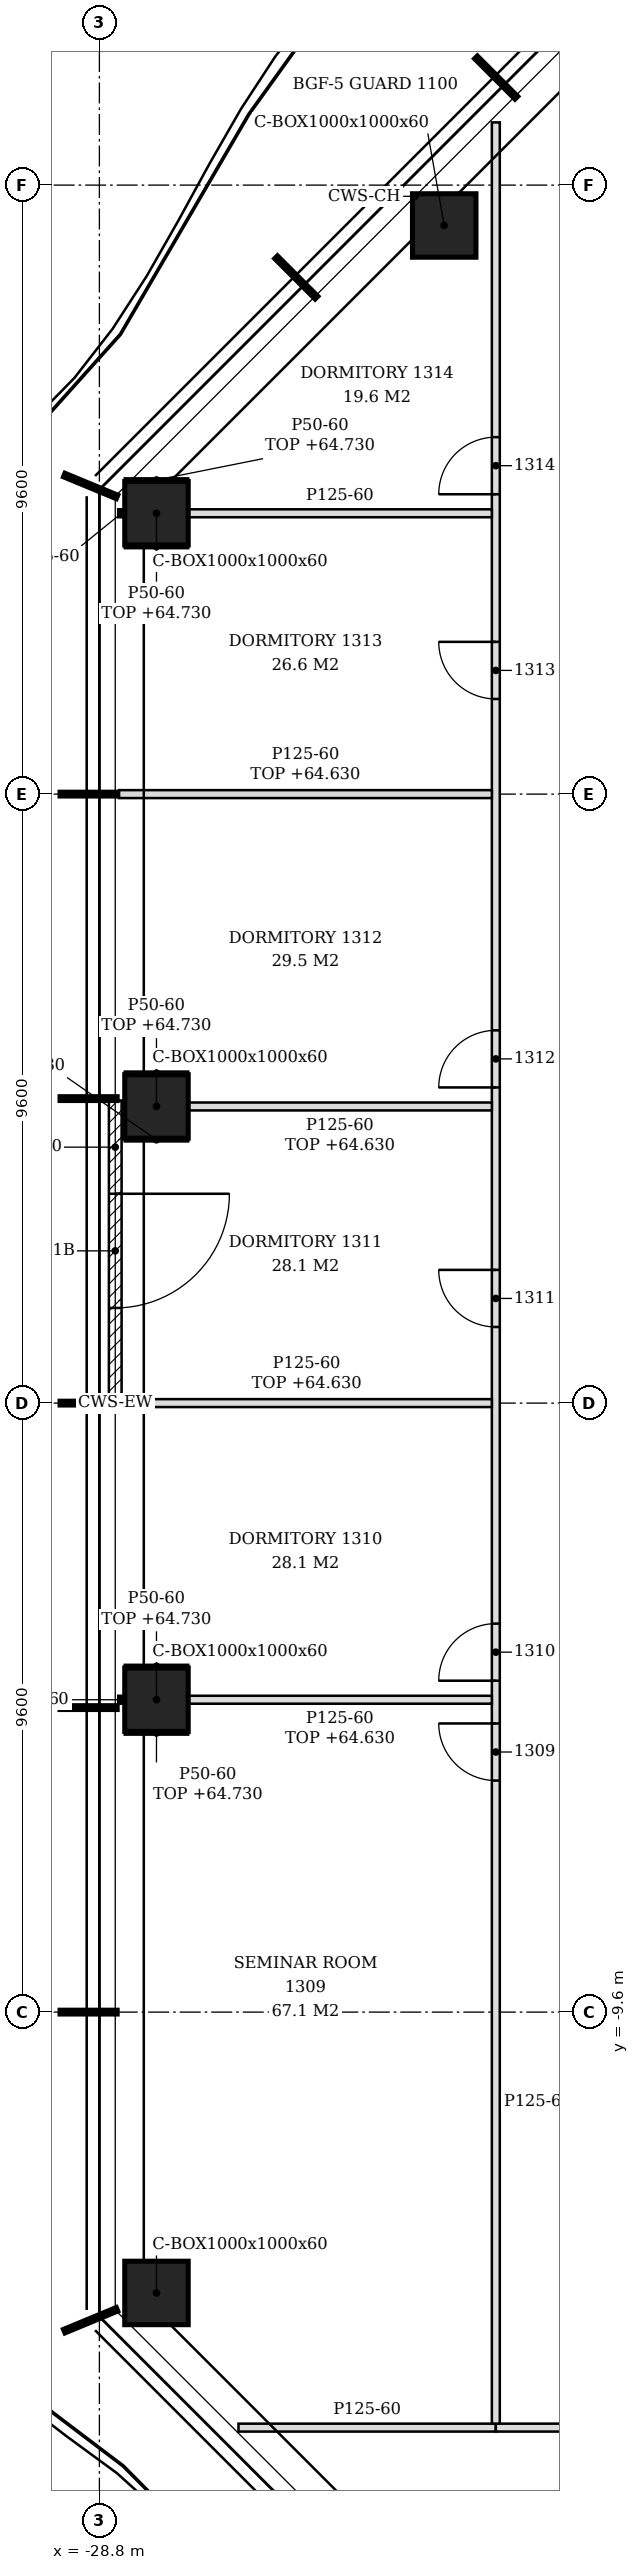
"""IFC4 building model, lengths in metres.
Left out: names, types, materials, properties, quantities, classifications, styles, units other than length and angle.
Written with IfcOpenShell. Run it as: python <this file> out.ifc"""

import sys

from ifc_helpers import new_model, si_unit, direction, frame, frame_2d, origin, origin_2d, place, context, subcontext, project, spatial, polyline, rectangle, hollow_rectangle, outline, extrude, element, fill, save


model = new_model("IFC4")
c1 = context("Model", 3, precision=1e-05, world=origin(), true_north=direction((0.0, 1.0)))
c2 = subcontext(c1, "Body", "Model", "MODEL_VIEW")
j1 = project(units=[si_unit("LENGTHUNIT", "METRE"), si_unit("PLANEANGLEUNIT", "RADIAN")], contexts=[c1])
p1 = place(None, origin())
s1 = spatial("IfcSite", under=j1, at=p1, CompositionType="ELEMENT")
p2 = place(p1, origin())
s2 = spatial("IfcBuilding", under=s1, at=p2, CompositionType="ELEMENT")
p3 = place(p2, frame((0.0, 0.0, 61.8)))
s3 = spatial("IfcBuildingStorey", under=s2, at=p3, CompositionType="ELEMENT", Elevation=61.8)
for number, where, z_axis, x_axis in (
    (1, (-23.364, 18.564, -0.15), (0.0, 0.0, 1.0), (1.0, 0.0, 0.0)),
    (2, (-27.9, 14.027, -0.15), (0.0, 0.0, 1.0), (1.0, 0.0, 0.0)),
    (3, (-27.9, 4.676, -0.15), (0.0, 0.0, 1.0), (1.0, 0.0, 0.0)),
    (4, (-27.9, -4.676, -0.15), (0.0, 0.0, 1.0), (1.0, 0.0, 0.0)),
    (5, (-27.9, -14.027, -0.15), (0.0, 0.0, 1.0), (1.0, 0.0, 0.0)),
):
    element("IfcColumn", number, at=place(p3, frame(where, z_axis=z_axis, x_axis=x_axis)), inside=s3, PredefinedType="COLUMN", context=c2, shape_type="SweptSolid", body=[
        extrude(hollow_rectangle(XDim=1.0, YDim=1.0, WallThickness=0.06, at=origin_2d()), origin(), (0.0, 0.0, 1.0), 3.6),
    ])
p4 = place(p3, frame((-28.55, 4.77, 0.0), z_axis=(0.0, 0.0, 1.0), x_axis=(0.0, -1.0, 0.0)))
e6 = element("IfcWall", 6, at=p4, inside=s3, PredefinedType="NOTDEFINED", context=c2, shape_type="SweptSolid", body=[
    extrude(rectangle(XDim=4.74, YDim=0.2, at=frame_2d((2.37, 0.0))), origin(), (0.0, 0.0, 1.0), 3.45),
])
p5 = place(p4, frame((1.47, 0.0, 0.0)))
e7 = element("IfcOpeningElement", 7, at=p5, cuts=e6, PredefinedType="OPENING", context=c2, shape_type="SweptSolid", body=[
    extrude(rectangle(XDim=1.8, YDim=2.4, at=frame_2d((0.9, 1.2))), frame((0.0, 0.11, 0.0), z_axis=(0.0, -1.0, 0.0), x_axis=(1.0, 0.0, 0.0)), (0.0, 0.0, 1.0), 0.22),
])
p6 = place(p3, frame((-26.607, -16.15, 0.0), z_axis=(0.0, 0.0, 1.0), x_axis=(1.0, 0.0, 0.0)))
e8 = element("IfcWall", 8, at=p6, inside=s3, PredefinedType="PARTITIONING", context=c2, shape_type="SweptSolid", body=[
    extrude(outline(polyline([(0.0, 0.0), (4.057, 0.0), (4.057, 3.45), (1.104, 3.45), (1.102, 2.93), (0.555, 2.93), (0.553, 3.45), (0.0, 3.45), (0.0, 0.0)])), frame((0.0, 0.062, 0.0), z_axis=(0.0, -1.0, 0.0), x_axis=(1.0, 0.0, 0.0)), (0.0, 0.0, 1.0), 0.125),
])
p7 = place(p3, frame((-22.55, -16.15, 0.0), z_axis=(0.0, 0.0, 1.0), x_axis=(1.0, 0.0, 0.0)))
e9 = element("IfcWall", 9, at=p7, inside=s3, PredefinedType="PARTITIONING", context=c2, shape_type="SweptSolid", body=[
    extrude(outline(polyline([(0.0, 0.0), (41.688, 0.0), (41.688, 2.73), (41.6, 2.73), (41.598, 3.45), (29.9, 3.45), (29.898, 2.73), (29.6, 2.73), (29.598, 3.45), (17.9, 3.45), (17.898, 2.73), (17.6, 2.73), (17.598, 3.45), (8.3, 3.45), (8.298, 2.93), (8.0, 2.93), (7.998, 3.45), (0.0, 3.45), (0.0, 0.0)])), frame((0.0, 0.062, 0.0), z_axis=(0.0, -1.0, 0.0), x_axis=(1.0, 0.0, 0.0)), (0.0, 0.0, 1.0), 0.125),
])
p8 = place(p7, frame((6.95, 0.0, 0.0)))
e10 = element("IfcOpeningElement", 10, at=p8, cuts=e9, PredefinedType="OPENING", context=c2, shape_type="SweptSolid", body=[
    extrude(rectangle(XDim=0.9, YDim=2.1, at=frame_2d((0.45, 1.05))), frame((0.0, 0.073, 0.0), z_axis=(0.0, -1.0, 0.0), x_axis=(1.0, 0.0, 0.0)), (0.0, 0.0, 1.0), 0.145),
])
p9 = place(p7, frame((11.936, 0.0, 0.0)))
e11 = element("IfcOpeningElement", 11, at=p9, cuts=e9, PredefinedType="OPENING", context=c2, shape_type="SweptSolid", body=[
    extrude(rectangle(XDim=0.9, YDim=2.1, at=frame_2d((0.45, 1.05))), frame((0.0, 0.073, 0.0), z_axis=(0.0, -1.0, 0.0), x_axis=(1.0, 0.0, 0.0)), (0.0, 0.0, 1.0), 0.145),
])
p10 = place(p7, frame((16.55, 0.0, 0.0)))
e12 = element("IfcOpeningElement", 12, at=p10, cuts=e9, PredefinedType="OPENING", context=c2, shape_type="SweptSolid", body=[
    extrude(rectangle(XDim=0.9, YDim=2.1, at=frame_2d((0.45, 1.05))), frame((0.0, 0.073, 0.0), z_axis=(0.0, -1.0, 0.0), x_axis=(1.0, 0.0, 0.0)), (0.0, 0.0, 1.0), 0.145),
])
p11 = place(p7, frame((21.35, 0.0, 0.0)))
e13 = element("IfcOpeningElement", 13, at=p11, cuts=e9, PredefinedType="OPENING", context=c2, shape_type="SweptSolid", body=[
    extrude(rectangle(XDim=0.9, YDim=2.1, at=frame_2d((0.45, 1.05))), frame((0.0, 0.073, 0.0), z_axis=(0.0, -1.0, 0.0), x_axis=(1.0, 0.0, 0.0)), (0.0, 0.0, 1.0), 0.145),
])
p12 = place(p7, frame((26.15, 0.0, 0.0)))
e14 = element("IfcOpeningElement", 14, at=p12, cuts=e9, PredefinedType="OPENING", context=c2, shape_type="SweptSolid", body=[
    extrude(rectangle(XDim=0.9, YDim=2.1, at=frame_2d((0.45, 1.05))), frame((0.0, 0.073, 0.0), z_axis=(0.0, -1.0, 0.0), x_axis=(1.0, 0.0, 0.0)), (0.0, 0.0, 1.0), 0.145),
])
p13 = place(p7, frame((30.764, 0.0, 0.0)))
e15 = element("IfcOpeningElement", 15, at=p13, cuts=e9, PredefinedType="OPENING", context=c2, shape_type="SweptSolid", body=[
    extrude(rectangle(XDim=0.9, YDim=2.1, at=frame_2d((0.45, 1.05))), frame((0.0, 0.073, 0.0), z_axis=(0.0, -1.0, 0.0), x_axis=(1.0, 0.0, 0.0)), (0.0, 0.0, 1.0), 0.145),
])
p14 = place(p7, frame((32.35, 0.0, 0.0)))
e16 = element("IfcOpeningElement", 16, at=p14, cuts=e9, PredefinedType="OPENING", context=c2, shape_type="SweptSolid", body=[
    extrude(rectangle(XDim=0.9, YDim=2.1, at=frame_2d((0.45, 1.05))), frame((0.0, 0.073, 0.0), z_axis=(0.0, -1.0, 0.0), x_axis=(1.0, 0.0, 0.0)), (0.0, 0.0, 1.0), 0.145),
])
p15 = place(p7, frame((37.25, 0.0, 0.0)))
e17 = element("IfcOpeningElement", 17, at=p15, cuts=e9, PredefinedType="OPENING", context=c2, shape_type="SweptSolid", body=[
    extrude(rectangle(XDim=0.9, YDim=2.1, at=frame_2d((0.45, 1.05))), frame((0.0, 0.073, 0.0), z_axis=(0.0, -1.0, 0.0), x_axis=(1.0, 0.0, 0.0)), (0.0, 0.0, 1.0), 0.145),
])
p16 = place(p3, frame((-22.55, -16.087, 0.0), z_axis=(0.0, 0.0, 1.0), x_axis=(0.0, 1.0, 0.0)))
e18 = element("IfcWall", 18, at=p16, inside=s3, PredefinedType="PARTITIONING", context=c2, shape_type="SweptSolid", body=[
    extrude(outline(polyline([(0.0, 0.0), (36.276, 0.0), (36.276, 3.45), (36.022, 3.45), (36.02, 2.63), (34.907, 2.63), (34.905, 3.45), (30.597, 3.45), (30.595, 2.83), (30.377, 2.83), (30.375, 3.45), (25.798, 3.45), (25.795, 2.83), (25.577, 2.83), (25.575, 3.45), (20.998, 3.45), (20.996, 2.83), (20.778, 2.83), (20.775, 3.45), (16.198, 3.45), (16.196, 2.83), (15.978, 2.83), (15.976, 3.45), (11.397, 3.45), (11.396, 2.83), (11.177, 2.83), (11.176, 3.45), (6.597, 3.45), (6.595, 2.83), (6.377, 2.83), (6.375, 3.45), (1.798, 3.45), (1.795, 2.83), (1.577, 2.83), (1.575, 3.45), (0.0, 3.45), (0.0, 0.0)])), frame((0.0, 0.062, 0.0), z_axis=(0.0, -1.0, 0.0), x_axis=(1.0, 0.0, 0.0)), (0.0, 0.0, 1.0), 0.125),
])
p17 = place(p16, frame((10.137, 0.0, 0.0)))
e19 = element("IfcOpeningElement", 19, at=p17, cuts=e18, PredefinedType="OPENING", context=c2, shape_type="SweptSolid", body=[
    extrude(rectangle(XDim=0.9, YDim=2.1, at=frame_2d((0.45, 1.05))), frame((0.0, 0.073, 0.0), z_axis=(0.0, -1.0, 0.0), x_axis=(1.0, 0.0, 0.0)), (0.0, 0.0, 1.0), 0.145),
])
p18 = place(p16, frame((11.711, 0.0, 0.0)))
e20 = element("IfcOpeningElement", 20, at=p18, cuts=e18, PredefinedType="OPENING", context=c2, shape_type="SweptSolid", body=[
    extrude(rectangle(XDim=0.9, YDim=2.1, at=frame_2d((0.45, 1.05))), frame((0.0, 0.073, 0.0), z_axis=(0.0, -1.0, 0.0), x_axis=(1.0, 0.0, 0.0)), (0.0, 0.0, 1.0), 0.145),
])
p19 = place(p16, frame((17.288, 0.0, 0.0)))
e21 = element("IfcOpeningElement", 21, at=p19, cuts=e18, PredefinedType="OPENING", context=c2, shape_type="SweptSolid", body=[
    extrude(rectangle(XDim=0.9, YDim=2.1, at=frame_2d((0.45, 1.05))), frame((0.0, 0.073, 0.0), z_axis=(0.0, -1.0, 0.0), x_axis=(1.0, 0.0, 0.0)), (0.0, 0.0, 1.0), 0.145),
])
p20 = place(p16, frame((21.063, 0.0, 0.0)))
e22 = element("IfcOpeningElement", 22, at=p20, cuts=e18, PredefinedType="OPENING", context=c2, shape_type="SweptSolid", body=[
    extrude(rectangle(XDim=0.9, YDim=2.1, at=frame_2d((0.45, 1.05))), frame((0.0, 0.073, 0.0), z_axis=(0.0, -1.0, 0.0), x_axis=(1.0, 0.0, 0.0)), (0.0, 0.0, 1.0), 0.145),
])
p21 = place(p16, frame((27.188, 0.0, 0.0)))
e23 = element("IfcOpeningElement", 23, at=p21, cuts=e18, PredefinedType="OPENING", context=c2, shape_type="SweptSolid", body=[
    extrude(rectangle(XDim=0.9, YDim=2.1, at=frame_2d((0.45, 1.05))), frame((0.0, 0.073, 0.0), z_axis=(0.0, -1.0, 0.0), x_axis=(1.0, 0.0, 0.0)), (0.0, 0.0, 1.0), 0.145),
])
p22 = place(p16, frame((30.415, 0.0, 0.0)))
e24 = element("IfcOpeningElement", 24, at=p22, cuts=e18, PredefinedType="OPENING", context=c2, shape_type="SweptSolid", body=[
    extrude(rectangle(XDim=0.9, YDim=2.1, at=frame_2d((0.45, 1.05))), frame((0.0, 0.073, 0.0), z_axis=(0.0, -1.0, 0.0), x_axis=(1.0, 0.0, 0.0)), (0.0, 0.0, 1.0), 0.145),
])
p23 = place(p3, frame((-28.503, -4.676, 0.0), z_axis=(0.0, 0.0, 1.0), x_axis=(1.0, 0.0, 0.0)))
e25 = element("IfcWall", 25, at=p23, inside=s3, PredefinedType="PARTITIONING", context=c2, shape_type="SweptSolid", body=[
    extrude(rectangle(XDim=0.103, YDim=0.125, at=frame_2d((0.052, 0.0))), origin(), (0.0, 0.0, 1.0), 3.45),
])
p24 = place(p3, frame((-27.4, -4.676, 0.0), z_axis=(0.0, 0.0, 1.0), x_axis=(1.0, 0.0, 0.0)))
e26 = element("IfcWall", 26, at=p24, inside=s3, PredefinedType="PARTITIONING", context=c2, shape_type="SweptSolid", body=[
    extrude(rectangle(XDim=4.787, YDim=0.125, at=frame_2d((2.394, 0.0))), origin(), (0.0, 0.0, 1.0), 2.83),
])
p25 = place(p3, frame((-28.45, 0.0, 0.0), z_axis=(0.0, 0.0, 1.0), x_axis=(1.0, 0.0, 0.0)))
e27 = element("IfcWall", 27, at=p25, inside=s3, PredefinedType="PARTITIONING", context=c2, shape_type="SweptSolid", body=[
    extrude(rectangle(XDim=5.837, YDim=0.125, at=frame_2d((2.919, 0.0))), origin(), (0.0, 0.0, 1.0), 2.83),
])
p26 = place(p3, frame((-27.4, 4.676, 0.0), z_axis=(0.0, 0.0, 1.0), x_axis=(1.0, 0.0, 0.0)))
e28 = element("IfcWall", 28, at=p26, inside=s3, PredefinedType="PARTITIONING", context=c2, shape_type="SweptSolid", body=[
    extrude(rectangle(XDim=4.787, YDim=0.125, at=frame_2d((2.394, 0.0))), origin(), (0.0, 0.0, 1.0), 2.83),
])
p27 = place(p3, frame((-28.49, 9.6, 0.0), z_axis=(0.0, 0.0, 1.0), x_axis=(1.0, 0.0, 0.0)))
e29 = element("IfcWall", 29, at=p27, inside=s3, PredefinedType="PARTITIONING", context=c2, shape_type="SweptSolid", body=[
    extrude(rectangle(XDim=5.877, YDim=0.125, at=frame_2d((2.939, 0.0))), origin(), (0.0, 0.0, 1.0), 2.83),
])
p28 = place(p3, frame((-28.503, 14.027, 0.0), z_axis=(0.0, 0.0, 1.0), x_axis=(1.0, 0.0, 0.0)))
e30 = element("IfcWall", 30, at=p28, inside=s3, PredefinedType="PARTITIONING", context=c2, shape_type="SweptSolid", body=[
    extrude(rectangle(XDim=0.103, YDim=0.125, at=frame_2d((0.052, 0.0))), origin(), (0.0, 0.0, 1.0), 3.45),
])
p29 = place(p3, frame((-27.4, 14.027, 0.0), z_axis=(0.0, 0.0, 1.0), x_axis=(1.0, 0.0, 0.0)))
e31 = element("IfcWall", 31, at=p29, inside=s3, PredefinedType="PARTITIONING", context=c2, shape_type="SweptSolid", body=[
    extrude(rectangle(XDim=4.787, YDim=0.125, at=frame_2d((2.394, 0.0))), origin(), (0.0, 0.0, 1.0), 3.45),
])
for number, where, z_axis, x_axis in (
    (32, (-28.4, -4.151, 0.0), (0.0, 0.0, 1.0), (1.0, 0.0, 0.0)),
    (33, (-28.4, -5.201, 0.0), (0.0, 0.0, 1.0), (1.0, 0.0, 0.0)),
    (34, (-28.4, 5.201, 0.0), (0.0, 0.0, 1.0), (1.0, 0.0, 0.0)),
    (35, (-28.4, 4.151, 0.0), (0.0, 0.0, 1.0), (1.0, 0.0, 0.0)),
    (36, (-28.4, 14.552, 0.0), (0.0, 0.0, 1.0), (1.0, 0.0, 0.0)),
    (37, (-28.4, 13.502, 0.0), (0.0, 0.0, 1.0), (1.0, 0.0, 0.0)),
):
    element("IfcWall", number, at=place(p3, frame(where, z_axis=z_axis, x_axis=x_axis)), inside=s3, PredefinedType="PARTITIONING", context=c2, shape_type="SweptSolid", body=[
        extrude(rectangle(XDim=1.0, YDim=0.05, at=frame_2d((0.5, 0.0))), origin(), (0.0, 0.0, 1.0), 2.93),
    ])
p30 = place(p5, origin())
e38 = element("IfcDoor", 38, at=p30, inside=s3, OperationType="SINGLE_SWING_LEFT", PredefinedType="DOOR", context=c2, shape_type="SweptSolid", body=[
    extrude(rectangle(XDim=1.8, YDim=2.4, at=frame_2d((0.9, 1.2))), frame((0.0, 0.025, 0.0), z_axis=(0.0, -1.0, 0.0), x_axis=(1.0, 0.0, 0.0)), (0.0, 0.0, 1.0), 0.05),
])
fill(e7, e38)
p31 = place(p17, origin())
e39 = element("IfcDoor", 39, at=p31, inside=s3, OperationType="SINGLE_SWING_RIGHT", PredefinedType="DOOR", context=c2, shape_type="SweptSolid", body=[
    extrude(rectangle(XDim=0.9, YDim=2.1, at=frame_2d((0.45, 1.05))), frame((0.0, 0.025, 0.0), z_axis=(0.0, -1.0, 0.0), x_axis=(1.0, 0.0, 0.0)), (0.0, 0.0, 1.0), 0.05),
])
fill(e19, e39)
p32 = place(p18, origin())
e40 = element("IfcDoor", 40, at=p32, inside=s3, OperationType="SINGLE_SWING_LEFT", PredefinedType="DOOR", context=c2, shape_type="SweptSolid", body=[
    extrude(rectangle(XDim=0.9, YDim=2.1, at=frame_2d((0.45, 1.05))), frame((0.0, 0.025, 0.0), z_axis=(0.0, -1.0, 0.0), x_axis=(1.0, 0.0, 0.0)), (0.0, 0.0, 1.0), 0.05),
])
fill(e20, e40)
p33 = place(p19, origin())
e41 = element("IfcDoor", 41, at=p33, inside=s3, OperationType="SINGLE_SWING_RIGHT", PredefinedType="DOOR", context=c2, shape_type="SweptSolid", body=[
    extrude(rectangle(XDim=0.9, YDim=2.1, at=frame_2d((0.45, 1.05))), frame((0.0, 0.025, 0.0), z_axis=(0.0, -1.0, 0.0), x_axis=(1.0, 0.0, 0.0)), (0.0, 0.0, 1.0), 0.05),
])
fill(e21, e41)
p34 = place(p20, origin())
e42 = element("IfcDoor", 42, at=p34, inside=s3, OperationType="SINGLE_SWING_LEFT", PredefinedType="DOOR", context=c2, shape_type="SweptSolid", body=[
    extrude(rectangle(XDim=0.9, YDim=2.1, at=frame_2d((0.45, 1.05))), frame((0.0, 0.025, 0.0), z_axis=(0.0, -1.0, 0.0), x_axis=(1.0, 0.0, 0.0)), (0.0, 0.0, 1.0), 0.05),
])
fill(e22, e42)
p35 = place(p21, origin())
e43 = element("IfcDoor", 43, at=p35, inside=s3, OperationType="SINGLE_SWING_RIGHT", PredefinedType="DOOR", context=c2, shape_type="SweptSolid", body=[
    extrude(rectangle(XDim=0.9, YDim=2.1, at=frame_2d((0.45, 1.05))), frame((0.0, 0.025, 0.0), z_axis=(0.0, -1.0, 0.0), x_axis=(1.0, 0.0, 0.0)), (0.0, 0.0, 1.0), 0.05),
])
fill(e23, e43)
p36 = place(p22, origin())
e44 = element("IfcDoor", 44, at=p36, inside=s3, OperationType="SINGLE_SWING_LEFT", PredefinedType="DOOR", context=c2, shape_type="SweptSolid", body=[
    extrude(rectangle(XDim=0.9, YDim=2.1, at=frame_2d((0.45, 1.05))), frame((0.0, 0.025, 0.0), z_axis=(0.0, -1.0, 0.0), x_axis=(1.0, 0.0, 0.0)), (0.0, 0.0, 1.0), 0.05),
])
fill(e24, e44)
save(model, sys.argv[1])
